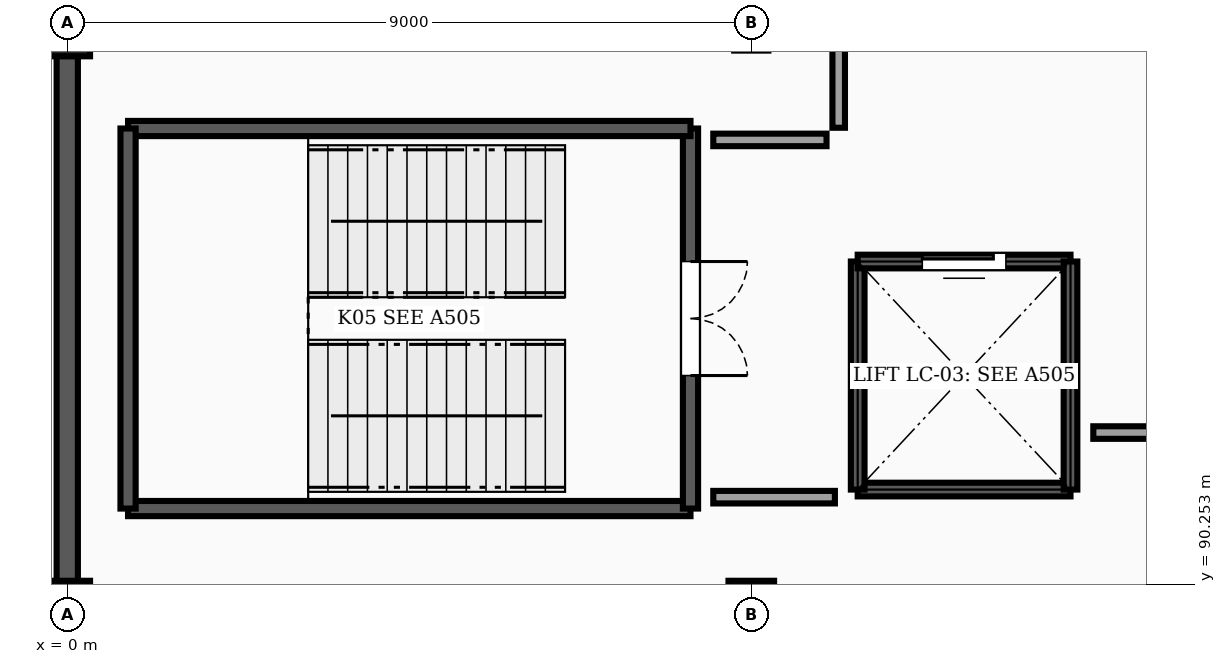
"""IFC4 building model, lengths in metres.
Left out: names, types, materials, properties, quantities, classifications, styles, units other than length and angle.
Written with IfcOpenShell. Run it as: python <this file> out.ifc"""

import sys

from ifc_helpers import new_model, si_unit, direction, frame, frame_2d, origin, origin_2d, place, context, subcontext, project, spatial, rectangle, extrude, element, fill, save


model = new_model("IFC4")
c1 = context("Model", 3, precision=1e-05, world=origin(), true_north=direction((0.0, 1.0)))
c2 = subcontext(c1, "Body", "Model", "MODEL_VIEW")
j1 = project(units=[si_unit("LENGTHUNIT", "METRE"), si_unit("PLANEANGLEUNIT", "RADIAN")], contexts=[c1])
p1 = place(None, origin())
s1 = spatial("IfcSite", under=j1, at=p1, CompositionType="ELEMENT")
p2 = place(p1, origin())
s2 = spatial("IfcBuilding", under=s1, at=p2, CompositionType="ELEMENT")
p3 = place(p2, origin())
s3 = spatial("IfcBuildingStorey", under=s2, at=p3, CompositionType="ELEMENT", Elevation=0.0)
for number, where, z_axis, x_axis in (
    (1, (0.0, 90.0, -0.25), (0.0, 0.0, 1.0), (1.0, 0.0, 0.0)),
    (2, (9.0, 90.0, -0.25), (0.0, 0.0, 1.0), (1.0, 0.0, 0.0)),
    (3, (0.0, 97.5, -0.25), (0.0, 0.0, 1.0), (1.0, 0.0, 0.0)),
):
    element("IfcColumn", number, at=place(p3, frame(where, z_axis=z_axis, x_axis=x_axis)), inside=s3, PredefinedType="COLUMN", context=c2, shape_type="SweptSolid", body=[
        extrude(rectangle(XDim=0.6, YDim=0.6, at=origin_2d()), origin(), (0.0, 0.0, 1.0), 4.75),
    ])
p4 = place(p3, frame((0.0, 90.296, 0.0), z_axis=(0.0, 0.0, 1.0), x_axis=(0.0, 1.0, 0.0)))
e4 = element("IfcWall", 4, at=p4, inside=s3, PredefinedType="SOLIDWALL", context=c2, shape_type="SweptSolid", body=[
    extrude(rectangle(XDim=6.908, YDim=0.28, at=frame_2d((3.454, 0.0))), origin(), (0.0, 0.0, 1.0), 3.442),
])
p5 = place(p3, frame((0.8, 91.25, 0.0), z_axis=(0.0, 0.0, 1.0), x_axis=(1.0, 0.0, 0.0)))
e5 = element("IfcWall", 5, at=p5, inside=s3, PredefinedType="SHEAR", context=c2, shape_type="SweptSolid", body=[
    extrude(rectangle(XDim=7.4, YDim=0.2, at=frame_2d((3.7, 0.0))), origin(), (0.0, 0.0, 1.0), 4.1),
])
p6 = place(p3, frame((8.2, 96.25, 0.0), z_axis=(0.0, 0.0, 1.0), x_axis=(0.0, -1.0, 0.0)))
e6 = element("IfcWall", 6, at=p6, inside=s3, PredefinedType="SHEAR", context=c2, shape_type="SweptSolid", body=[
    extrude(rectangle(XDim=5.0, YDim=0.2, at=frame_2d((2.5, 0.0))), origin(), (0.0, 0.0, 1.0), 4.1),
])
p7 = place(p6, frame((1.75, 0.0, 0.0)))
e7 = element("IfcOpeningElement", 7, at=p7, cuts=e6, PredefinedType="OPENING", context=c2, shape_type="SweptSolid", body=[
    extrude(rectangle(XDim=1.5, YDim=2.15, at=frame_2d((0.75, 1.075))), frame((0.0, 0.11, 0.0), z_axis=(0.0, -1.0, 0.0), x_axis=(1.0, 0.0, 0.0)), (0.0, 0.0, 1.0), 0.22),
])
p8 = place(p3, frame((8.2, 96.25, 0.0), z_axis=(0.0, 0.0, 1.0), x_axis=(-1.0, 0.0, 0.0)))
e8 = element("IfcWall", 8, at=p8, inside=s3, PredefinedType="SHEAR", context=c2, shape_type="SweptSolid", body=[
    extrude(rectangle(XDim=7.4, YDim=0.2, at=frame_2d((3.7, 0.0))), origin(), (0.0, 0.0, 1.0), 4.1),
])
p9 = place(p3, frame((0.8, 96.25, 0.0), z_axis=(0.0, 0.0, 1.0), x_axis=(0.0, -1.0, 0.0)))
e9 = element("IfcWall", 9, at=p9, inside=s3, PredefinedType="SHEAR", context=c2, shape_type="SweptSolid", body=[
    extrude(rectangle(XDim=5.0, YDim=0.2, at=frame_2d((2.5, 0.0))), origin(), (0.0, 0.0, 1.0), 4.1),
])
p10 = place(p3, frame((13.2, 91.5, -0.2), z_axis=(0.0, 0.0, 1.0), x_axis=(-1.0, 0.0, 0.0)))
e10 = element("IfcWall", 10, at=p10, inside=s3, PredefinedType="SHEAR", context=c2, shape_type="SweptSolid", body=[
    extrude(rectangle(XDim=2.8, YDim=0.18, at=frame_2d((1.4, 0.0))), origin(), (0.0, 0.0, 1.0), 4.3),
])
p11 = place(p3, frame((10.4, 91.5, -0.2), z_axis=(0.0, 0.0, 1.0), x_axis=(0.0, 1.0, 0.0)))
e11 = element("IfcWall", 11, at=p11, inside=s3, PredefinedType="SHEAR", context=c2, shape_type="SweptSolid", body=[
    extrude(rectangle(XDim=3.0, YDim=0.18, at=frame_2d((1.5, 0.0))), origin(), (0.0, 0.0, 1.0), 4.3),
])
p12 = place(p3, frame((10.4, 94.5, -0.2), z_axis=(0.0, 0.0, 1.0), x_axis=(1.0, 0.0, 0.0)))
e12 = element("IfcWall", 12, at=p12, inside=s3, PredefinedType="SHEAR", context=c2, shape_type="SweptSolid", body=[
    extrude(rectangle(XDim=2.8, YDim=0.18, at=frame_2d((1.4, 0.0))), origin(), (0.0, 0.0, 1.0), 4.3),
])
p13 = place(p12, frame((0.85, 0.0, 0.2)))
e13 = element("IfcOpeningElement", 13, at=p13, cuts=e12, PredefinedType="OPENING", context=c2, shape_type="SweptSolid", body=[
    extrude(rectangle(XDim=1.1, YDim=2.15, at=frame_2d((0.55, 1.075))), frame((0.0, 0.1, 0.0), z_axis=(0.0, -1.0, 0.0), x_axis=(1.0, 0.0, 0.0)), (0.0, 0.0, 1.0), 0.2),
])
p14 = place(p3, frame((13.2, 94.5, -0.2), z_axis=(0.0, 0.0, 1.0), x_axis=(0.0, -1.0, 0.0)))
e14 = element("IfcWall", 14, at=p14, inside=s3, PredefinedType="SHEAR", context=c2, shape_type="SweptSolid", body=[
    extrude(rectangle(XDim=3.0, YDim=0.18, at=frame_2d((1.5, 0.0))), origin(), (0.0, 0.0, 1.0), 4.3),
])
p15 = place(p3, frame((17.84, 92.25, 0.0), z_axis=(0.0, 0.0, 1.0), x_axis=(-1.0, 0.0, 0.0)))
e15 = element("IfcWall", 15, at=p15, inside=s3, PredefinedType="PARTITIONING", context=c2, shape_type="SweptSolid", body=[
    extrude(rectangle(XDim=4.34, YDim=0.165, at=frame_2d((2.17, 0.0))), origin(), (0.0, 0.0, 1.0), 4.1),
])
p16 = place(p15, frame((1.47, 0.0, 0.0)))
e16 = element("IfcOpeningElement", 16, at=p16, cuts=e15, PredefinedType="OPENING", context=c2, shape_type="SweptSolid", body=[
    extrude(rectangle(XDim=1.4, YDim=2.15, at=frame_2d((0.7, 1.075))), frame((0.0, 0.093, 0.0), z_axis=(0.0, -1.0, 0.0), x_axis=(1.0, 0.0, 0.0)), (0.0, 0.0, 1.0), 0.185),
])
p17 = place(p3, frame((10.1, 91.4, 0.0), z_axis=(0.0, 0.0, 1.0), x_axis=(-1.0, 0.0, 0.0)))
e17 = element("IfcWall", 17, at=p17, inside=s3, PredefinedType="PARTITIONING", context=c2, shape_type="SweptSolid", body=[
    extrude(rectangle(XDim=1.6, YDim=0.165, at=frame_2d((0.8, 0.0))), origin(), (0.0, 0.0, 1.0), 4.1),
])
p18 = place(p3, frame((8.5, 96.1, 0.0), z_axis=(0.0, 0.0, 1.0), x_axis=(1.0, 0.0, 0.0)))
e18 = element("IfcWall", 18, at=p18, inside=s3, PredefinedType="PARTITIONING", context=c2, shape_type="SweptSolid", body=[
    extrude(rectangle(XDim=1.49, YDim=0.165, at=frame_2d((0.745, 0.0))), origin(), (0.0, 0.0, 1.0), 4.1),
])
p19 = place(p3, frame((10.15, 96.26, 0.0), z_axis=(0.0, 0.0, 1.0), x_axis=(0.0, 1.0, 0.0)))
e19 = element("IfcWall", 19, at=p19, inside=s3, PredefinedType="PARTITIONING", context=c2, shape_type="SweptSolid", body=[
    extrude(rectangle(XDim=1.48, YDim=0.165, at=frame_2d((0.74, 0.0))), origin(), (0.0, 0.0, 1.0), 4.1),
])
p20 = place(p7, origin())
e20 = element("IfcDoor", 20, at=p20, inside=s3, OperationType="DOUBLE_DOOR_SINGLE_SWING", PredefinedType="DOOR", context=c2, shape_type="SweptSolid", body=[
    extrude(rectangle(XDim=1.5, YDim=2.15, at=frame_2d((0.75, 1.075))), frame((0.0, 0.025, 0.0), z_axis=(0.0, -1.0, 0.0), x_axis=(1.0, 0.0, 0.0)), (0.0, 0.0, 1.0), 0.05),
])
fill(e7, e20)
p21 = place(p13, origin())
e21 = element("IfcDoor", 21, at=p21, inside=s3, OperationType="SLIDING_TO_LEFT", PredefinedType="DOOR", context=c2, shape_type="SweptSolid", body=[
    extrude(rectangle(XDim=1.1, YDim=2.15, at=frame_2d((0.55, 1.075))), frame((0.0, 0.025, 0.0), z_axis=(0.0, -1.0, 0.0), x_axis=(1.0, 0.0, 0.0)), (0.0, 0.0, 1.0), 0.05),
])
fill(e13, e21)
save(model, sys.argv[1])
